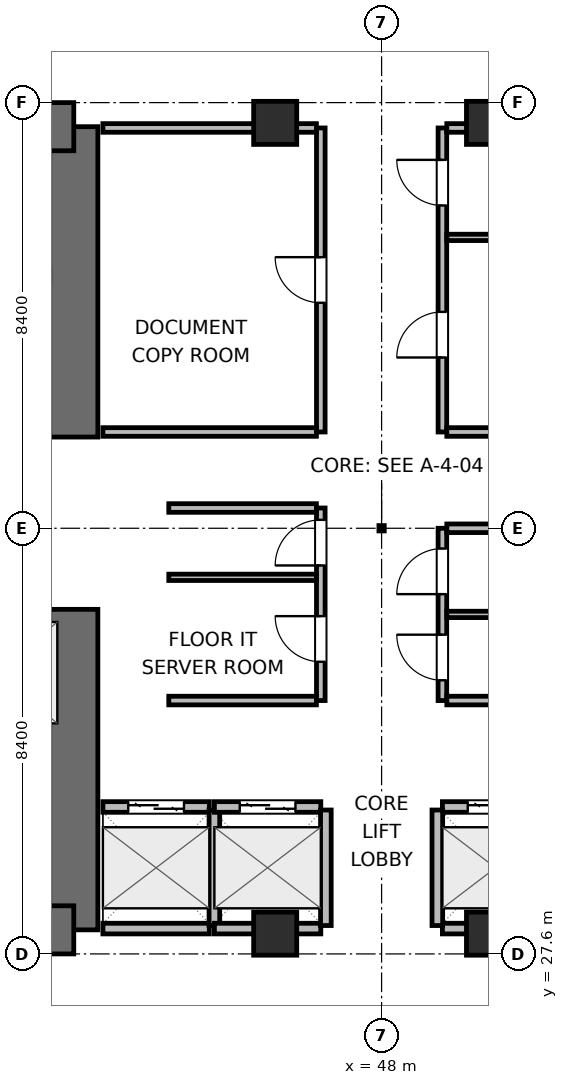
"""IFC4 building model, lengths in metres.
Left out: names, types, materials, properties, quantities, classifications, styles, units other than length and angle.
Written with IfcOpenShell. Run it as: python <this file> out.ifc"""

import sys

from ifc_helpers import new_model, si_unit, direction, frame, frame_2d, origin, origin_2d, place, context, subcontext, project, spatial, rectangle, extrude, element, fill, save


model = new_model("IFC4")
c1 = context("Model", 3, precision=1e-05, world=origin(), true_north=direction((0.0, 1.0)))
c2 = subcontext(c1, "Body", "Model", "MODEL_VIEW")
j1 = project(units=[si_unit("LENGTHUNIT", "METRE"), si_unit("PLANEANGLEUNIT", "RADIAN")], contexts=[c1])
p1 = place(None, origin())
s1 = spatial("IfcSite", under=j1, at=p1, CompositionType="ELEMENT")
p2 = place(p1, origin())
s2 = spatial("IfcBuilding", under=s1, at=p2, CompositionType="ELEMENT")
p3 = place(p2, frame((0.0, 0.0, 52.8)))
s3 = spatial("IfcBuildingStorey", under=s2, at=p3, CompositionType="ELEMENT", Elevation=52.8)
p4 = place(p3, frame((41.925, 28.075, 0.0), z_axis=(0.0, 0.0, 1.0), x_axis=(0.0, 1.0, 0.0)))
e1 = element("IfcWall", 1, at=p4, inside=s3, PredefinedType="SHEAR", context=c2, shape_type="SweptSolid", body=[
    extrude(rectangle(XDim=6.325, YDim=0.95, at=frame_2d((3.163, 0.0))), origin(), (0.0, 0.0, 1.0), 3.9),
])
p5 = place(p3, frame((41.925, 37.8, 0.0), z_axis=(0.0, 0.0, 1.0), x_axis=(0.0, 1.0, 0.0)))
e2 = element("IfcWall", 2, at=p5, inside=s3, PredefinedType="SHEAR", context=c2, shape_type="SweptSolid", body=[
    extrude(rectangle(XDim=6.125, YDim=0.95, at=frame_2d((3.062, 0.0))), origin(), (0.0, 0.0, 1.0), 3.9),
])
p6 = place(p3, frame((32.875, 28.075, 0.0), z_axis=(0.0, 0.0, 1.0), x_axis=(1.0, 0.0, 0.0)))
e3 = element("IfcWall", 3, at=p6, inside=s3, PredefinedType="SHEAR", context=c2, shape_type="SweptSolid", body=[
    extrude(rectangle(XDim=9.05, YDim=0.95, at=frame_2d((4.525, 0.0))), origin(), (0.0, 0.0, 1.0), 3.9),
])
p7 = place(p6, frame((4.975, 0.0, 0.0)))
e4 = element("IfcOpeningElement", 4, at=p7, cuts=e3, PredefinedType="OPENING", context=c2, shape_type="SweptSolid", body=[
    extrude(rectangle(XDim=1.05, YDim=2.04, at=frame_2d((0.525, 1.02))), frame((0.0, 0.485, 0.0), z_axis=(0.0, -1.0, 0.0), x_axis=(1.0, 0.0, 0.0)), (0.0, 0.0, 1.0), 0.97),
])
p8 = place(p3, frame((32.875, 43.925, 0.0), z_axis=(0.0, 0.0, 1.0), x_axis=(1.0, 0.0, 0.0)))
e5 = element("IfcWall", 5, at=p8, inside=s3, PredefinedType="SHEAR", context=c2, shape_type="SweptSolid", body=[
    extrude(rectangle(XDim=9.05, YDim=0.95, at=frame_2d((4.525, 0.0))), origin(), (0.0, 0.0, 1.0), 3.9),
])
p9 = place(p8, frame((0.975, 0.0, 0.0)))
e6 = element("IfcOpeningElement", 6, at=p9, cuts=e5, PredefinedType="OPENING", context=c2, shape_type="SweptSolid", body=[
    extrude(rectangle(XDim=0.95, YDim=2.04, at=frame_2d((0.475, 1.02))), frame((0.0, 0.485, 0.0), z_axis=(0.0, -1.0, 0.0), x_axis=(1.0, 0.0, 0.0)), (0.0, 0.0, 1.0), 0.97),
])
p10 = place(p8, frame((4.225, 0.0, 0.0)))
e7 = element("IfcOpeningElement", 7, at=p10, cuts=e5, PredefinedType="OPENING", context=c2, shape_type="SweptSolid", body=[
    extrude(rectangle(XDim=0.9, YDim=2.02, at=frame_2d((0.45, 1.01))), frame((0.0, 0.485, 0.0), z_axis=(0.0, -1.0, 0.0), x_axis=(1.0, 0.0, 0.0)), (0.0, 0.0, 1.0), 0.97),
])
p11 = place(p8, frame((7.125, 0.0, 0.0)))
e8 = element("IfcOpeningElement", 8, at=p11, cuts=e5, PredefinedType="OPENING", context=c2, shape_type="SweptSolid", body=[
    extrude(rectangle(XDim=0.9, YDim=2.02, at=frame_2d((0.45, 1.01))), frame((0.0, 0.485, 0.0), z_axis=(0.0, -1.0, 0.0), x_axis=(1.0, 0.0, 0.0)), (0.0, 0.0, 1.0), 0.97),
])
for number, where, z_axis, x_axis in (
    (9, (45.9, 28.0, 0.0), (0.0, 0.0, 1.0), (1.0, 0.0, 0.0)),
    (10, (50.1, 28.0, 0.0), (0.0, 0.0, 1.0), (1.0, 0.0, 0.0)),
    (11, (45.9, 44.0, 0.0), (0.0, 0.0, 1.0), (1.0, 0.0, 0.0)),
    (12, (50.1, 44.0, 0.0), (0.0, 0.0, 1.0), (1.0, 0.0, 0.0)),
):
    element("IfcColumn", number, at=place(p3, frame(where, z_axis=z_axis, x_axis=x_axis)), inside=s3, PredefinedType="COLUMN", context=c2, shape_type="SweptSolid", body=[
        extrude(rectangle(XDim=0.85, YDim=0.85, at=origin_2d()), origin(), (0.0, 0.0, 1.0), 3.9),
    ])
p12 = place(p3, frame((42.5, 30.5, 0.0), z_axis=(0.0, 0.0, 1.0), x_axis=(1.0, 0.0, 0.0)))
e13 = element("IfcWall", 13, at=p12, inside=s3, PredefinedType="PARTITIONING", context=c2, shape_type="SweptSolid", body=[
    extrude(rectangle(XDim=2.1, YDim=0.21, at=frame_2d((1.05, 0.0))), origin(), (0.0, 0.0, 1.0), 3.64),
])
p13 = place(p12, frame((0.5, 0.0, 0.0)))
e14 = element("IfcOpeningElement", 14, at=p13, cuts=e13, PredefinedType="OPENING", context=c2, shape_type="SweptSolid", body=[
    extrude(rectangle(XDim=1.1, YDim=2.04, at=frame_2d((0.55, 1.02))), frame((0.0, 0.115, 0.0), z_axis=(0.0, -1.0, 0.0), x_axis=(1.0, 0.0, 0.0)), (0.0, 0.0, 1.0), 0.23),
])
p14 = place(p3, frame((42.5, 28.1, 0.0), z_axis=(0.0, 0.0, 1.0), x_axis=(1.0, 0.0, 0.0)))
e15 = element("IfcWall", 15, at=p14, inside=s3, PredefinedType="PARTITIONING", context=c2, shape_type="SweptSolid", body=[
    extrude(rectangle(XDim=2.1, YDim=0.21, at=frame_2d((1.05, 0.0))), origin(), (0.0, 0.0, 1.0), 2.525),
])
p15 = place(p3, frame((44.7, 28.16, 0.0), z_axis=(0.0, 0.0, 1.0), x_axis=(0.0, 1.0, 0.0)))
e16 = element("IfcWall", 16, at=p15, inside=s3, PredefinedType="PARTITIONING", context=c2, shape_type="SweptSolid", body=[
    extrude(rectangle(XDim=2.28, YDim=0.21, at=frame_2d((1.14, 0.0))), origin(), (0.0, 0.0, 1.0), 3.64),
])
p16 = place(p3, frame((44.7, 30.5, 0.0), z_axis=(0.0, 0.0, 1.0), x_axis=(1.0, 0.0, 0.0)))
e17 = element("IfcWall", 17, at=p16, inside=s3, PredefinedType="PARTITIONING", context=c2, shape_type="SweptSolid", body=[
    extrude(rectangle(XDim=2.1, YDim=0.21, at=frame_2d((1.05, 0.0))), origin(), (0.0, 0.0, 1.0), 3.64),
])
p17 = place(p16, frame((0.5, 0.0, 0.0)))
e18 = element("IfcOpeningElement", 18, at=p17, cuts=e17, PredefinedType="OPENING", context=c2, shape_type="SweptSolid", body=[
    extrude(rectangle(XDim=1.1, YDim=2.04, at=frame_2d((0.55, 1.02))), frame((0.0, 0.115, 0.0), z_axis=(0.0, -1.0, 0.0), x_axis=(1.0, 0.0, 0.0)), (0.0, 0.0, 1.0), 0.23),
])
p18 = place(p3, frame((44.7, 28.1, 0.0), z_axis=(0.0, 0.0, 1.0), x_axis=(1.0, 0.0, 0.0)))
e19 = element("IfcWall", 19, at=p18, inside=s3, PredefinedType="PARTITIONING", context=c2, shape_type="SweptSolid", body=[
    extrude(rectangle(XDim=2.1, YDim=0.21, at=frame_2d((1.05, 0.0))), origin(), (0.0, 0.0, 1.0), 2.525),
])
p19 = place(p3, frame((46.9, 28.16, 0.0), z_axis=(0.0, 0.0, 1.0), x_axis=(0.0, 1.0, 0.0)))
e20 = element("IfcWall", 20, at=p19, inside=s3, PredefinedType="PARTITIONING", context=c2, shape_type="SweptSolid", body=[
    extrude(rectangle(XDim=2.28, YDim=0.21, at=frame_2d((1.14, 0.0))), origin(), (0.0, 0.0, 1.0), 3.64),
])
p20 = place(p3, frame((49.2, 30.5, 0.0), z_axis=(0.0, 0.0, 1.0), x_axis=(1.0, 0.0, 0.0)))
e21 = element("IfcWall", 21, at=p20, inside=s3, PredefinedType="PARTITIONING", context=c2, shape_type="SweptSolid", body=[
    extrude(rectangle(XDim=2.1, YDim=0.21, at=frame_2d((1.05, 0.0))), origin(), (0.0, 0.0, 1.0), 3.64),
])
p21 = place(p20, frame((0.5, 0.0, 0.0)))
e22 = element("IfcOpeningElement", 22, at=p21, cuts=e21, PredefinedType="OPENING", context=c2, shape_type="SweptSolid", body=[
    extrude(rectangle(XDim=1.1, YDim=2.04, at=frame_2d((0.55, 1.02))), frame((0.0, 0.115, 0.0), z_axis=(0.0, -1.0, 0.0), x_axis=(1.0, 0.0, 0.0)), (0.0, 0.0, 1.0), 0.23),
])
p22 = place(p3, frame((49.2, 28.1, 0.0), z_axis=(0.0, 0.0, 1.0), x_axis=(1.0, 0.0, 0.0)))
e23 = element("IfcWall", 23, at=p22, inside=s3, PredefinedType="PARTITIONING", context=c2, shape_type="SweptSolid", body=[
    extrude(rectangle(XDim=2.1, YDim=0.21, at=frame_2d((1.05, 0.0))), origin(), (0.0, 0.0, 1.0), 2.525),
])
p23 = place(p3, frame((49.1, 28.16, 0.0), z_axis=(0.0, 0.0, 1.0), x_axis=(0.0, 1.0, 0.0)))
e24 = element("IfcWall", 24, at=p23, inside=s3, PredefinedType="PARTITIONING", context=c2, shape_type="SweptSolid", body=[
    extrude(rectangle(XDim=2.28, YDim=0.21, at=frame_2d((1.14, 0.0))), origin(), (0.0, 0.0, 1.0), 3.64),
])
p24 = place(p3, frame((46.8, 32.6, 0.0), z_axis=(0.0, 0.0, 1.0), x_axis=(0.0, 1.0, 0.0)))
e25 = element("IfcWall", 25, at=p24, inside=s3, PredefinedType="PARTITIONING", context=c2, shape_type="SweptSolid", body=[
    extrude(rectangle(XDim=3.8, YDim=0.17, at=frame_2d((1.9, 0.0))), origin(), (0.0, 0.0, 1.0), 3.64),
])
p25 = place(p24, frame((0.766, 0.0, 0.0)))
e26 = element("IfcOpeningElement", 26, at=p25, cuts=e25, PredefinedType="OPENING", context=c2, shape_type="SweptSolid", body=[
    extrude(rectangle(XDim=0.9, YDim=2.02, at=frame_2d((0.45, 1.01))), frame((0.0, 0.095, 0.0), z_axis=(0.0, -1.0, 0.0), x_axis=(1.0, 0.0, 0.0)), (0.0, 0.0, 1.0), 0.19),
])
p26 = place(p24, frame((2.666, 0.0, 0.0)))
e27 = element("IfcOpeningElement", 27, at=p26, cuts=e25, PredefinedType="OPENING", context=c2, shape_type="SweptSolid", body=[
    extrude(rectangle(XDim=0.9, YDim=2.02, at=frame_2d((0.45, 1.01))), frame((0.0, 0.095, 0.0), z_axis=(0.0, -1.0, 0.0), x_axis=(1.0, 0.0, 0.0)), (0.0, 0.0, 1.0), 0.19),
])
for number, where, z_axis, x_axis in (
    (28, (43.8, 32.6, 0.0), (0.0, 0.0, 1.0), (1.0, 0.0, 0.0)),
    (29, (43.8, 36.4, 0.0), (0.0, 0.0, 1.0), (1.0, 0.0, 0.0)),
):
    element("IfcWall", number, at=place(p3, frame(where, z_axis=z_axis, x_axis=x_axis)), inside=s3, PredefinedType="PARTITIONING", context=c2, shape_type="SweptSolid", body=[
        extrude(rectangle(XDim=2.913, YDim=0.17, at=frame_2d((1.457, 0.0))), origin(), (0.0, 0.0, 1.0), 3.64),
    ])
p27 = place(p3, frame((43.8, 35.032, 0.0), z_axis=(0.0, 0.0, 1.0), x_axis=(1.0, 0.0, 0.0)))
e30 = element("IfcWall", 30, at=p27, inside=s3, PredefinedType="PARTITIONING", context=c2, shape_type="SweptSolid", body=[
    extrude(rectangle(XDim=2.913, YDim=0.125, at=frame_2d((1.457, 0.0))), origin(), (0.0, 0.0, 1.0), 3.64),
])
p28 = place(p3, frame((49.2, 32.6, 0.0), z_axis=(0.0, 0.0, 1.0), x_axis=(0.0, 1.0, 0.0)))
e31 = element("IfcWall", 31, at=p28, inside=s3, PredefinedType="PARTITIONING", context=c2, shape_type="SweptSolid", body=[
    extrude(rectangle(XDim=3.4, YDim=0.17, at=frame_2d((1.7, 0.0))), origin(), (0.0, 0.0, 1.0), 3.64),
])
p29 = place(p28, frame((0.4, 0.0, 0.0)))
e32 = element("IfcOpeningElement", 32, at=p29, cuts=e31, PredefinedType="OPENING", context=c2, shape_type="SweptSolid", body=[
    extrude(rectangle(XDim=0.9, YDim=2.02, at=frame_2d((0.45, 1.01))), frame((0.0, 0.095, 0.0), z_axis=(0.0, -1.0, 0.0), x_axis=(1.0, 0.0, 0.0)), (0.0, 0.0, 1.0), 0.19),
])
p30 = place(p28, frame((2.1, 0.0, 0.0)))
e33 = element("IfcOpeningElement", 33, at=p30, cuts=e31, PredefinedType="OPENING", context=c2, shape_type="SweptSolid", body=[
    extrude(rectangle(XDim=0.9, YDim=2.02, at=frame_2d((0.45, 1.01))), frame((0.0, 0.095, 0.0), z_axis=(0.0, -1.0, 0.0), x_axis=(1.0, 0.0, 0.0)), (0.0, 0.0, 1.0), 0.19),
])
for number, where, z_axis, x_axis in (
    (34, (49.287, 32.6, 0.0), (0.0, 0.0, 1.0), (1.0, 0.0, 0.0)),
    (35, (49.287, 36.0, 0.0), (0.0, 0.0, 1.0), (1.0, 0.0, 0.0)),
):
    element("IfcWall", number, at=place(p3, frame(where, z_axis=z_axis, x_axis=x_axis)), inside=s3, PredefinedType="PARTITIONING", context=c2, shape_type="SweptSolid", body=[
        extrude(rectangle(XDim=2.913, YDim=0.17, at=frame_2d((1.457, 0.0))), origin(), (0.0, 0.0, 1.0), 3.64),
    ])
p31 = place(p3, frame((49.287, 34.3, 0.0), z_axis=(0.0, 0.0, 1.0), x_axis=(1.0, 0.0, 0.0)))
e36 = element("IfcWall", 36, at=p31, inside=s3, PredefinedType="PARTITIONING", context=c2, shape_type="SweptSolid", body=[
    extrude(rectangle(XDim=2.913, YDim=0.125, at=frame_2d((1.457, 0.0))), origin(), (0.0, 0.0, 1.0), 3.64),
])
p32 = place(p3, frame((46.8, 37.9, 0.0), z_axis=(0.0, 0.0, 1.0), x_axis=(0.0, 1.0, 0.0)))
e37 = element("IfcWall", 37, at=p32, inside=s3, PredefinedType="PARTITIONING", context=c2, shape_type="SweptSolid", body=[
    extrude(rectangle(XDim=6.0, YDim=0.17, at=frame_2d((3.0, 0.0))), origin(), (0.0, 0.0, 1.0), 3.64),
])
p33 = place(p32, frame((2.55, 0.0, 0.0)))
e38 = element("IfcOpeningElement", 38, at=p33, cuts=e37, PredefinedType="OPENING", context=c2, shape_type="SweptSolid", body=[
    extrude(rectangle(XDim=0.9, YDim=2.02, at=frame_2d((0.45, 1.01))), frame((0.0, 0.095, 0.0), z_axis=(0.0, -1.0, 0.0), x_axis=(1.0, 0.0, 0.0)), (0.0, 0.0, 1.0), 0.19),
])
p34 = place(p3, frame((42.5, 37.9, 0.0), z_axis=(0.0, 0.0, 1.0), x_axis=(1.0, 0.0, 0.0)))
e39 = element("IfcWall", 39, at=p34, inside=s3, PredefinedType="PARTITIONING", context=c2, shape_type="SweptSolid", body=[
    extrude(rectangle(XDim=4.213, YDim=0.17, at=frame_2d((2.106, 0.0))), origin(), (0.0, 0.0, 1.0), 3.64),
])
p35 = place(p3, frame((42.5, 43.9, 0.0), z_axis=(0.0, 0.0, 1.0), x_axis=(1.0, 0.0, 0.0)))
e40 = element("IfcWall", 40, at=p35, inside=s3, PredefinedType="PARTITIONING", context=c2, shape_type="SweptSolid", body=[
    extrude(rectangle(XDim=4.213, YDim=0.17, at=frame_2d((2.106, 0.0))), origin(), (0.0, 0.0, 1.0), 2.525),
])
p36 = place(p3, frame((49.2, 37.9, 0.0), z_axis=(0.0, 0.0, 1.0), x_axis=(0.0, 1.0, 0.0)))
e41 = element("IfcWall", 41, at=p36, inside=s3, PredefinedType="PARTITIONING", context=c2, shape_type="SweptSolid", body=[
    extrude(rectangle(XDim=6.0, YDim=0.17, at=frame_2d((3.0, 0.0))), origin(), (0.0, 0.0, 1.0), 3.64),
])
p37 = place(p36, frame((1.47, 0.0, 0.0)))
e42 = element("IfcOpeningElement", 42, at=p37, cuts=e41, PredefinedType="OPENING", context=c2, shape_type="SweptSolid", body=[
    extrude(rectangle(XDim=0.9, YDim=2.02, at=frame_2d((0.45, 1.01))), frame((0.0, 0.095, 0.0), z_axis=(0.0, -1.0, 0.0), x_axis=(1.0, 0.0, 0.0)), (0.0, 0.0, 1.0), 0.19),
])
p38 = place(p36, frame((4.47, 0.0, 0.0)))
e43 = element("IfcOpeningElement", 43, at=p38, cuts=e41, PredefinedType="OPENING", context=c2, shape_type="SweptSolid", body=[
    extrude(rectangle(XDim=0.9, YDim=2.02, at=frame_2d((0.45, 1.01))), frame((0.0, 0.095, 0.0), z_axis=(0.0, -1.0, 0.0), x_axis=(1.0, 0.0, 0.0)), (0.0, 0.0, 1.0), 0.19),
])
p39 = place(p3, frame((49.287, 37.9, 0.0), z_axis=(0.0, 0.0, 1.0), x_axis=(1.0, 0.0, 0.0)))
e44 = element("IfcWall", 44, at=p39, inside=s3, PredefinedType="PARTITIONING", context=c2, shape_type="SweptSolid", body=[
    extrude(rectangle(XDim=4.113, YDim=0.17, at=frame_2d((2.056, 0.0))), origin(), (0.0, 0.0, 1.0), 3.64),
])
p40 = place(p3, frame((49.287, 43.9, 0.0), z_axis=(0.0, 0.0, 1.0), x_axis=(1.0, 0.0, 0.0)))
e45 = element("IfcWall", 45, at=p40, inside=s3, PredefinedType="PARTITIONING", context=c2, shape_type="SweptSolid", body=[
    extrude(rectangle(XDim=4.113, YDim=0.17, at=frame_2d((2.056, 0.0))), origin(), (0.0, 0.0, 1.0), 2.525),
])
p41 = place(p3, frame((49.287, 41.74, 0.0), z_axis=(0.0, 0.0, 1.0), x_axis=(1.0, 0.0, 0.0)))
e46 = element("IfcWall", 46, at=p41, inside=s3, PredefinedType="PARTITIONING", context=c2, shape_type="SweptSolid", body=[
    extrude(rectangle(XDim=4.113, YDim=0.125, at=frame_2d((2.056, 0.0))), origin(), (0.0, 0.0, 1.0), 3.64),
])
p42 = place(p13, origin())
e47 = element("IfcDoor", 47, at=p42, inside=s3, OperationType="DOUBLE_DOOR_SLIDING", PredefinedType="DOOR", context=c2, shape_type="SweptSolid", body=[
    extrude(rectangle(XDim=1.1, YDim=2.04, at=frame_2d((0.55, 1.02))), frame((0.0, 0.025, 0.0), z_axis=(0.0, -1.0, 0.0), x_axis=(1.0, 0.0, 0.0)), (0.0, 0.0, 1.0), 0.05),
])
fill(e14, e47)
p43 = place(p17, origin())
e48 = element("IfcDoor", 48, at=p43, inside=s3, OperationType="DOUBLE_DOOR_SLIDING", PredefinedType="DOOR", context=c2, shape_type="SweptSolid", body=[
    extrude(rectangle(XDim=1.1, YDim=2.04, at=frame_2d((0.55, 1.02))), frame((0.0, 0.025, 0.0), z_axis=(0.0, -1.0, 0.0), x_axis=(1.0, 0.0, 0.0)), (0.0, 0.0, 1.0), 0.05),
])
fill(e18, e48)
p44 = place(p21, origin())
e49 = element("IfcDoor", 49, at=p44, inside=s3, OperationType="DOUBLE_DOOR_SLIDING", PredefinedType="DOOR", context=c2, shape_type="SweptSolid", body=[
    extrude(rectangle(XDim=1.1, YDim=2.04, at=frame_2d((0.55, 1.02))), frame((0.0, 0.025, 0.0), z_axis=(0.0, -1.0, 0.0), x_axis=(1.0, 0.0, 0.0)), (0.0, 0.0, 1.0), 0.05),
])
fill(e22, e49)
p45 = place(p25, origin())
e50 = element("IfcDoor", 50, at=p45, inside=s3, OperationType="SINGLE_SWING_RIGHT", PredefinedType="DOOR", context=c2, shape_type="SweptSolid", body=[
    extrude(rectangle(XDim=0.9, YDim=2.02, at=frame_2d((0.45, 1.01))), frame((0.0, 0.025, 0.0), z_axis=(0.0, -1.0, 0.0), x_axis=(1.0, 0.0, 0.0)), (0.0, 0.0, 1.0), 0.05),
])
fill(e26, e50)
p46 = place(p26, origin())
e51 = element("IfcDoor", 51, at=p46, inside=s3, OperationType="SINGLE_SWING_LEFT", PredefinedType="DOOR", context=c2, shape_type="SweptSolid", body=[
    extrude(rectangle(XDim=0.9, YDim=2.02, at=frame_2d((0.45, 1.01))), frame((0.0, 0.025, 0.0), z_axis=(0.0, -1.0, 0.0), x_axis=(1.0, 0.0, 0.0)), (0.0, 0.0, 1.0), 0.05),
])
fill(e27, e51)
p47 = place(p29, origin())
e52 = element("IfcDoor", 52, at=p47, inside=s3, OperationType="SINGLE_SWING_RIGHT", PredefinedType="DOOR", context=c2, shape_type="SweptSolid", body=[
    extrude(rectangle(XDim=0.9, YDim=2.02, at=frame_2d((0.45, 1.01))), frame((0.0, 0.025, 0.0), z_axis=(0.0, -1.0, 0.0), x_axis=(1.0, 0.0, 0.0)), (0.0, 0.0, 1.0), 0.05),
])
fill(e32, e52)
p48 = place(p30, origin())
e53 = element("IfcDoor", 53, at=p48, inside=s3, OperationType="SINGLE_SWING_LEFT", PredefinedType="DOOR", context=c2, shape_type="SweptSolid", body=[
    extrude(rectangle(XDim=0.9, YDim=2.02, at=frame_2d((0.45, 1.01))), frame((0.0, 0.025, 0.0), z_axis=(0.0, -1.0, 0.0), x_axis=(1.0, 0.0, 0.0)), (0.0, 0.0, 1.0), 0.05),
])
fill(e33, e53)
p49 = place(p33, origin())
e54 = element("IfcDoor", 54, at=p49, inside=s3, OperationType="SINGLE_SWING_RIGHT", PredefinedType="DOOR", context=c2, shape_type="SweptSolid", body=[
    extrude(rectangle(XDim=0.9, YDim=2.02, at=frame_2d((0.45, 1.01))), frame((0.0, 0.025, 0.0), z_axis=(0.0, -1.0, 0.0), x_axis=(1.0, 0.0, 0.0)), (0.0, 0.0, 1.0), 0.05),
])
fill(e38, e54)
p50 = place(p37, origin())
e55 = element("IfcDoor", 55, at=p50, inside=s3, OperationType="SINGLE_SWING_LEFT", PredefinedType="DOOR", context=c2, shape_type="SweptSolid", body=[
    extrude(rectangle(XDim=0.9, YDim=2.02, at=frame_2d((0.45, 1.01))), frame((0.0, 0.025, 0.0), z_axis=(0.0, -1.0, 0.0), x_axis=(1.0, 0.0, 0.0)), (0.0, 0.0, 1.0), 0.05),
])
fill(e42, e55)
p51 = place(p38, origin())
e56 = element("IfcDoor", 56, at=p51, inside=s3, OperationType="SINGLE_SWING_RIGHT", PredefinedType="DOOR", context=c2, shape_type="SweptSolid", body=[
    extrude(rectangle(XDim=0.9, YDim=2.02, at=frame_2d((0.45, 1.01))), frame((0.0, 0.025, 0.0), z_axis=(0.0, -1.0, 0.0), x_axis=(1.0, 0.0, 0.0)), (0.0, 0.0, 1.0), 0.05),
])
fill(e43, e56)
save(model, sys.argv[1])
